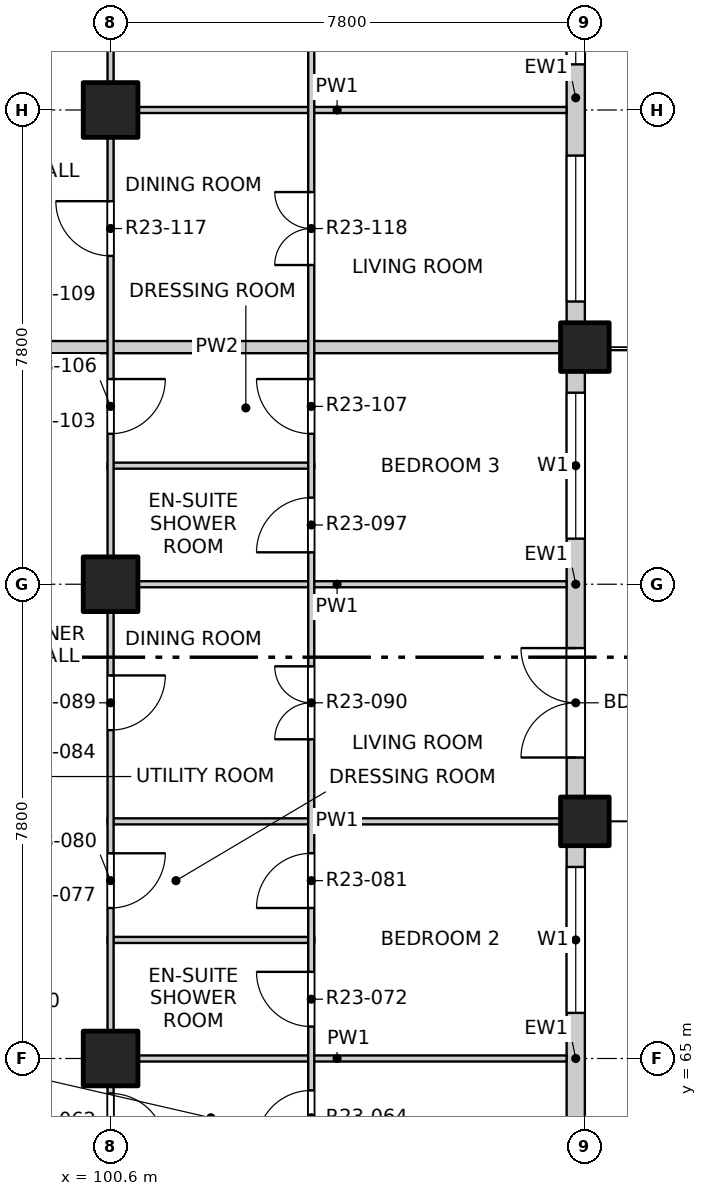
"""IFC4 building model, lengths in metres.
Left out: names, types, materials, properties, quantities, classifications, styles, units other than length and angle.
Written with IfcOpenShell. Run it as: python <this file> out.ifc"""

import sys

from ifc_helpers import new_model, si_unit, direction, frame, frame_2d, origin, origin_2d, place, context, subcontext, project, spatial, rectangle, extrude, element, fill, save


model = new_model("IFC4")
c1 = context("Model", 3, precision=1e-05, world=origin(), true_north=direction((0.0, 1.0)))
c2 = subcontext(c1, "Body", "Model", "MODEL_VIEW")
j1 = project(units=[si_unit("LENGTHUNIT", "METRE"), si_unit("PLANEANGLEUNIT", "RADIAN")], contexts=[c1])
p1 = place(None, origin())
s1 = spatial("IfcSite", under=j1, at=p1, CompositionType="ELEMENT")
p2 = place(p1, origin())
s2 = spatial("IfcBuilding", under=s1, at=p2, CompositionType="ELEMENT")
p3 = place(p2, frame((0.0, 0.0, 234.7)))
s3 = spatial("IfcBuildingStorey", under=s2, at=p3, CompositionType="ELEMENT", Elevation=234.7)
for number, where, z_axis, x_axis in (
    (1, (108.4, 68.9, -0.25), (0.0, 0.0, 1.0), (1.0, 0.0, 0.0)),
    (2, (108.4, 76.7, -0.25), (0.0, 0.0, 1.0), (1.0, 0.0, 0.0)),
):
    element("IfcColumn", number, at=place(p3, frame(where, z_axis=z_axis, x_axis=x_axis)), inside=s3, PredefinedType="COLUMN", context=c2, shape_type="SweptSolid", body=[
        extrude(rectangle(XDim=0.8, YDim=0.8, at=origin_2d()), origin(), (0.0, 0.0, 1.0), 3.4),
    ])
for number, where, z_axis, x_axis in (
    (3, (100.6, 65.0, -0.25), (0.0, 0.0, 1.0), (1.0, 0.0, 0.0)),
    (4, (100.6, 72.8, -0.25), (0.0, 0.0, 1.0), (1.0, 0.0, 0.0)),
    (5, (100.6, 80.6, -0.25), (0.0, 0.0, 1.0), (1.0, 0.0, 0.0)),
):
    element("IfcColumn", number, at=place(p3, frame(where, z_axis=z_axis, x_axis=x_axis)), inside=s3, PredefinedType="COLUMN", context=c2, shape_type="SweptSolid", body=[
        extrude(rectangle(XDim=0.9, YDim=0.9, at=origin_2d()), origin(), (0.0, 0.0, 1.0), 3.4),
    ])
p4 = place(p3, frame((108.25, 61.5, 0.0), z_axis=(0.0, 0.0, 1.0), x_axis=(0.0, 1.0, 0.0)))
e6 = element("IfcWall", 6, at=p4, inside=s3, PredefinedType="SOLIDWALL", context=c2, shape_type="SweptSolid", body=[
    extrude(rectangle(XDim=7.0, YDim=0.3, at=frame_2d((3.5, 0.0))), origin(), (0.0, 0.0, 1.0), 2.7),
])
p5 = place(p4, frame((0.65, 0.0, 0.0)))
e7 = element("IfcOpeningElement", 7, at=p5, cuts=e6, PredefinedType="OPENING", context=c2, shape_type="SweptSolid", body=[
    extrude(rectangle(XDim=1.8, YDim=2.4, at=frame_2d((0.9, 1.2))), frame((0.0, 0.16, 0.0), z_axis=(0.0, -1.0, 0.0), x_axis=(1.0, 0.0, 0.0)), (0.0, 0.0, 1.0), 0.32),
])
p6 = place(p4, frame((4.25, 0.0, 0.9)))
e8 = element("IfcOpeningElement", 8, at=p6, cuts=e6, PredefinedType="OPENING", context=c2, shape_type="SweptSolid", body=[
    extrude(rectangle(XDim=2.4, YDim=1.8, at=frame_2d((1.2, 0.9))), frame((0.0, 0.16, 0.0), z_axis=(0.0, -1.0, 0.0), x_axis=(1.0, 0.0, 0.0)), (0.0, 0.0, 1.0), 0.32),
])
p7 = place(p3, frame((108.25, 69.3, 0.0), z_axis=(0.0, 0.0, 1.0), x_axis=(0.0, 1.0, 0.0)))
e9 = element("IfcWall", 9, at=p7, inside=s3, PredefinedType="SOLIDWALL", context=c2, shape_type="SweptSolid", body=[
    extrude(rectangle(XDim=7.0, YDim=0.3, at=frame_2d((3.5, 0.0))), origin(), (0.0, 0.0, 1.0), 2.7),
])
p8 = place(p7, frame((0.65, 0.0, 0.0)))
e10 = element("IfcOpeningElement", 10, at=p8, cuts=e9, PredefinedType="OPENING", context=c2, shape_type="SweptSolid", body=[
    extrude(rectangle(XDim=1.8, YDim=2.4, at=frame_2d((0.9, 1.2))), frame((0.0, 0.16, 0.0), z_axis=(0.0, -1.0, 0.0), x_axis=(1.0, 0.0, 0.0)), (0.0, 0.0, 1.0), 0.32),
])
p9 = place(p7, frame((4.25, 0.0, 0.9)))
e11 = element("IfcOpeningElement", 11, at=p9, cuts=e9, PredefinedType="OPENING", context=c2, shape_type="SweptSolid", body=[
    extrude(rectangle(XDim=2.4, YDim=1.8, at=frame_2d((1.2, 0.9))), frame((0.0, 0.16, 0.0), z_axis=(0.0, -1.0, 0.0), x_axis=(1.0, 0.0, 0.0)), (0.0, 0.0, 1.0), 0.32),
])
p10 = place(p3, frame((108.25, 77.1, 0.0), z_axis=(0.0, 0.0, 1.0), x_axis=(0.0, 1.0, 0.0)))
e12 = element("IfcWall", 12, at=p10, inside=s3, PredefinedType="SOLIDWALL", context=c2, shape_type="SweptSolid", body=[
    extrude(rectangle(XDim=7.4, YDim=0.3, at=frame_2d((3.7, 0.0))), origin(), (0.0, 0.0, 1.0), 2.7),
])
p11 = place(p10, frame((0.35, 0.0, 0.9)))
e13 = element("IfcOpeningElement", 13, at=p11, cuts=e12, PredefinedType="OPENING", context=c2, shape_type="SweptSolid", body=[
    extrude(rectangle(XDim=2.4, YDim=1.8, at=frame_2d((1.2, 0.9))), frame((0.0, 0.16, 0.0), z_axis=(0.0, -1.0, 0.0), x_axis=(1.0, 0.0, 0.0)), (0.0, 0.0, 1.0), 0.32),
])
p12 = place(p10, frame((4.25, 0.0, 0.9)))
e14 = element("IfcOpeningElement", 14, at=p12, cuts=e12, PredefinedType="OPENING", context=c2, shape_type="SweptSolid", body=[
    extrude(rectangle(XDim=2.4, YDim=1.8, at=frame_2d((1.2, 0.9))), frame((0.0, 0.16, 0.0), z_axis=(0.0, -1.0, 0.0), x_axis=(1.0, 0.0, 0.0)), (0.0, 0.0, 1.0), 0.32),
])
p13 = place(p3, frame((100.55, 65.0, 0.0), z_axis=(0.0, 0.0, 1.0), x_axis=(1.0, 0.0, 0.0)))
e15 = element("IfcWall", 15, at=p13, inside=s3, PredefinedType="PARTITIONING", context=c2, shape_type="SweptSolid", body=[
    extrude(rectangle(XDim=7.55, YDim=0.1, at=frame_2d((3.775, 0.0))), origin(), (0.0, 0.0, 1.0), 3.15),
])
p14 = place(p3, frame((100.55, 66.95, 0.0), z_axis=(0.0, 0.0, 1.0), x_axis=(1.0, 0.0, 0.0)))
e16 = element("IfcWall", 16, at=p14, inside=s3, PredefinedType="PARTITIONING", context=c2, shape_type="SweptSolid", body=[
    extrude(rectangle(XDim=3.4, YDim=0.1, at=frame_2d((1.7, 0.0))), origin(), (0.0, 0.0, 1.0), 3.15),
])
p15 = place(p3, frame((100.55, 68.9, 0.0), z_axis=(0.0, 0.0, 1.0), x_axis=(1.0, 0.0, 0.0)))
e17 = element("IfcWall", 17, at=p15, inside=s3, PredefinedType="PARTITIONING", context=c2, shape_type="SweptSolid", body=[
    extrude(rectangle(XDim=7.55, YDim=0.1, at=frame_2d((3.775, 0.0))), origin(), (0.0, 0.0, 1.0), 2.55),
])
p16 = place(p3, frame((100.55, 72.8, 0.0), z_axis=(0.0, 0.0, 1.0), x_axis=(1.0, 0.0, 0.0)))
e18 = element("IfcWall", 18, at=p16, inside=s3, PredefinedType="PARTITIONING", context=c2, shape_type="SweptSolid", body=[
    extrude(rectangle(XDim=7.55, YDim=0.1, at=frame_2d((3.775, 0.0))), origin(), (0.0, 0.0, 1.0), 3.15),
])
p17 = place(p3, frame((100.55, 74.75, 0.0), z_axis=(0.0, 0.0, 1.0), x_axis=(1.0, 0.0, 0.0)))
e19 = element("IfcWall", 19, at=p17, inside=s3, PredefinedType="PARTITIONING", context=c2, shape_type="SweptSolid", body=[
    extrude(rectangle(XDim=3.4, YDim=0.1, at=frame_2d((1.7, 0.0))), origin(), (0.0, 0.0, 1.0), 3.15),
])
p18 = place(p3, frame((96.6, 76.7, 0.0), z_axis=(0.0, 0.0, 1.0), x_axis=(1.0, 0.0, 0.0)))
e20 = element("IfcWall", 20, at=p18, inside=s3, PredefinedType="PARTITIONING", context=c2, shape_type="SweptSolid", body=[
    extrude(rectangle(XDim=11.5, YDim=0.2, at=frame_2d((5.75, 0.0))), origin(), (0.0, 0.0, 1.0), 2.55),
])
p19 = place(p3, frame((100.55, 80.6, 0.0), z_axis=(0.0, 0.0, 1.0), x_axis=(1.0, 0.0, 0.0)))
e21 = element("IfcWall", 21, at=p19, inside=s3, PredefinedType="PARTITIONING", context=c2, shape_type="SweptSolid", body=[
    extrude(rectangle(XDim=7.55, YDim=0.1, at=frame_2d((3.775, 0.0))), origin(), (0.0, 0.0, 1.0), 3.15),
])
p20 = place(p3, frame((100.6, 41.9, 0.0), z_axis=(0.0, 0.0, 1.0), x_axis=(0.0, 1.0, 0.0)))
e22 = element("IfcWall", 22, at=p20, inside=s3, PredefinedType="PARTITIONING", context=c2, shape_type="SweptSolid", body=[
    extrude(rectangle(XDim=46.2, YDim=0.1, at=frame_2d((23.1, 0.0))), origin(), (0.0, 0.0, 1.0), 3.15),
])
p21 = place(p20, frame((1.2, 0.0, 0.0)))
e23 = element("IfcOpeningElement", 23, at=p21, cuts=e22, PredefinedType="OPENING", context=c2, shape_type="SweptSolid", body=[
    extrude(rectangle(XDim=0.9, YDim=2.1, at=frame_2d((0.45, 1.05))), frame((0.0, 0.06, 0.0), z_axis=(0.0, -1.0, 0.0), x_axis=(1.0, 0.0, 0.0)), (0.0, 0.0, 1.0), 0.12),
])
p22 = place(p20, frame((6.025, 0.0, 0.0)))
e24 = element("IfcOpeningElement", 24, at=p22, cuts=e22, PredefinedType="OPENING", context=c2, shape_type="SweptSolid", body=[
    extrude(rectangle(XDim=0.9, YDim=2.1, at=frame_2d((0.45, 1.05))), frame((0.0, 0.06, 0.0), z_axis=(0.0, -1.0, 0.0), x_axis=(1.0, 0.0, 0.0)), (0.0, 0.0, 1.0), 0.12),
])
p23 = place(p20, frame((9.975, 0.0, 0.0)))
e25 = element("IfcOpeningElement", 25, at=p23, cuts=e22, PredefinedType="OPENING", context=c2, shape_type="SweptSolid", body=[
    extrude(rectangle(XDim=0.9, YDim=2.1, at=frame_2d((0.45, 1.05))), frame((0.0, 0.06, 0.0), z_axis=(0.0, -1.0, 0.0), x_axis=(1.0, 0.0, 0.0)), (0.0, 0.0, 1.0), 0.12),
])
p24 = place(p20, frame((12.9, 0.0, 0.0)))
e26 = element("IfcOpeningElement", 26, at=p24, cuts=e22, PredefinedType="OPENING", context=c2, shape_type="SweptSolid", body=[
    extrude(rectangle(XDim=0.9, YDim=2.1, at=frame_2d((0.45, 1.05))), frame((0.0, 0.06, 0.0), z_axis=(0.0, -1.0, 0.0), x_axis=(1.0, 0.0, 0.0)), (0.0, 0.0, 1.0), 0.12),
])
p25 = place(p20, frame((17.775, 0.0, 0.0)))
e27 = element("IfcOpeningElement", 27, at=p25, cuts=e22, PredefinedType="OPENING", context=c2, shape_type="SweptSolid", body=[
    extrude(rectangle(XDim=0.9, YDim=2.1, at=frame_2d((0.45, 1.05))), frame((0.0, 0.06, 0.0), z_axis=(0.0, -1.0, 0.0), x_axis=(1.0, 0.0, 0.0)), (0.0, 0.0, 1.0), 0.12),
])
p26 = place(p20, frame((21.625, 0.0, 0.0)))
e28 = element("IfcOpeningElement", 28, at=p26, cuts=e22, PredefinedType="OPENING", context=c2, shape_type="SweptSolid", body=[
    extrude(rectangle(XDim=0.9, YDim=2.1, at=frame_2d((0.45, 1.05))), frame((0.0, 0.06, 0.0), z_axis=(0.0, -1.0, 0.0), x_axis=(1.0, 0.0, 0.0)), (0.0, 0.0, 1.0), 0.12),
])
p27 = place(p20, frame((25.575, 0.0, 0.0)))
e29 = element("IfcOpeningElement", 29, at=p27, cuts=e22, PredefinedType="OPENING", context=c2, shape_type="SweptSolid", body=[
    extrude(rectangle(XDim=0.9, YDim=2.1, at=frame_2d((0.45, 1.05))), frame((0.0, 0.06, 0.0), z_axis=(0.0, -1.0, 0.0), x_axis=(1.0, 0.0, 0.0)), (0.0, 0.0, 1.0), 0.12),
])
p28 = place(p20, frame((28.5, 0.0, 0.0)))
e30 = element("IfcOpeningElement", 30, at=p28, cuts=e22, PredefinedType="OPENING", context=c2, shape_type="SweptSolid", body=[
    extrude(rectangle(XDim=0.9, YDim=2.1, at=frame_2d((0.45, 1.05))), frame((0.0, 0.06, 0.0), z_axis=(0.0, -1.0, 0.0), x_axis=(1.0, 0.0, 0.0)), (0.0, 0.0, 1.0), 0.12),
])
p29 = place(p20, frame((33.375, 0.0, 0.0)))
e31 = element("IfcOpeningElement", 31, at=p29, cuts=e22, PredefinedType="OPENING", context=c2, shape_type="SweptSolid", body=[
    extrude(rectangle(XDim=0.9, YDim=2.1, at=frame_2d((0.45, 1.05))), frame((0.0, 0.06, 0.0), z_axis=(0.0, -1.0, 0.0), x_axis=(1.0, 0.0, 0.0)), (0.0, 0.0, 1.0), 0.12),
])
p30 = place(p20, frame((36.3, 0.0, 0.0)))
e32 = element("IfcOpeningElement", 32, at=p30, cuts=e22, PredefinedType="OPENING", context=c2, shape_type="SweptSolid", body=[
    extrude(rectangle(XDim=0.9, YDim=2.1, at=frame_2d((0.45, 1.05))), frame((0.0, 0.06, 0.0), z_axis=(0.0, -1.0, 0.0), x_axis=(1.0, 0.0, 0.0)), (0.0, 0.0, 1.0), 0.12),
])
p31 = place(p20, frame((40.2, 0.0, 0.0)))
e33 = element("IfcOpeningElement", 33, at=p31, cuts=e22, PredefinedType="OPENING", context=c2, shape_type="SweptSolid", body=[
    extrude(rectangle(XDim=0.9, YDim=2.1, at=frame_2d((0.45, 1.05))), frame((0.0, 0.06, 0.0), z_axis=(0.0, -1.0, 0.0), x_axis=(1.0, 0.0, 0.0)), (0.0, 0.0, 1.0), 0.12),
])
p32 = place(p20, frame((44.1, 0.0, 0.0)))
e34 = element("IfcOpeningElement", 34, at=p32, cuts=e22, PredefinedType="OPENING", context=c2, shape_type="SweptSolid", body=[
    extrude(rectangle(XDim=0.9, YDim=2.1, at=frame_2d((0.45, 1.05))), frame((0.0, 0.06, 0.0), z_axis=(0.0, -1.0, 0.0), x_axis=(1.0, 0.0, 0.0)), (0.0, 0.0, 1.0), 0.12),
])
p33 = place(p3, frame((103.9, 61.2, 0.0), z_axis=(0.0, 0.0, 1.0), x_axis=(0.0, 1.0, 0.0)))
e35 = element("IfcWall", 35, at=p33, inside=s3, PredefinedType="PARTITIONING", context=c2, shape_type="SweptSolid", body=[
    extrude(rectangle(XDim=26.9, YDim=0.1, at=frame_2d((13.45, 0.0))), origin(), (0.0, 0.0, 1.0), 3.15),
])
p34 = place(p33, frame((0.425, 0.0, 0.0)))
e36 = element("IfcOpeningElement", 36, at=p34, cuts=e35, PredefinedType="OPENING", context=c2, shape_type="SweptSolid", body=[
    extrude(rectangle(XDim=0.9, YDim=2.1, at=frame_2d((0.45, 1.05))), frame((0.0, 0.06, 0.0), z_axis=(0.0, -1.0, 0.0), x_axis=(1.0, 0.0, 0.0)), (0.0, 0.0, 1.0), 0.12),
])
p35 = place(p33, frame((2.375, 0.0, 0.0)))
e37 = element("IfcOpeningElement", 37, at=p35, cuts=e35, PredefinedType="OPENING", context=c2, shape_type="SweptSolid", body=[
    extrude(rectangle(XDim=0.9, YDim=2.1, at=frame_2d((0.45, 1.05))), frame((0.0, 0.06, 0.0), z_axis=(0.0, -1.0, 0.0), x_axis=(1.0, 0.0, 0.0)), (0.0, 0.0, 1.0), 0.12),
])
p36 = place(p33, frame((4.325, 0.0, 0.0)))
e38 = element("IfcOpeningElement", 38, at=p36, cuts=e35, PredefinedType="OPENING", context=c2, shape_type="SweptSolid", body=[
    extrude(rectangle(XDim=0.9, YDim=2.1, at=frame_2d((0.45, 1.05))), frame((0.0, 0.06, 0.0), z_axis=(0.0, -1.0, 0.0), x_axis=(1.0, 0.0, 0.0)), (0.0, 0.0, 1.0), 0.12),
])
p37 = place(p33, frame((6.275, 0.0, 0.0)))
e39 = element("IfcOpeningElement", 39, at=p37, cuts=e35, PredefinedType="OPENING", context=c2, shape_type="SweptSolid", body=[
    extrude(rectangle(XDim=0.9, YDim=2.1, at=frame_2d((0.45, 1.05))), frame((0.0, 0.06, 0.0), z_axis=(0.0, -1.0, 0.0), x_axis=(1.0, 0.0, 0.0)), (0.0, 0.0, 1.0), 0.12),
])
p38 = place(p33, frame((9.05, 0.0, 0.0)))
e40 = element("IfcOpeningElement", 40, at=p38, cuts=e35, PredefinedType="OPENING", context=c2, shape_type="SweptSolid", body=[
    extrude(rectangle(XDim=1.2, YDim=2.1, at=frame_2d((0.6, 1.05))), frame((0.0, 0.06, 0.0), z_axis=(0.0, -1.0, 0.0), x_axis=(1.0, 0.0, 0.0)), (0.0, 0.0, 1.0), 0.12),
])
p39 = place(p33, frame((12.125, 0.0, 0.0)))
e41 = element("IfcOpeningElement", 41, at=p39, cuts=e35, PredefinedType="OPENING", context=c2, shape_type="SweptSolid", body=[
    extrude(rectangle(XDim=0.9, YDim=2.1, at=frame_2d((0.45, 1.05))), frame((0.0, 0.06, 0.0), z_axis=(0.0, -1.0, 0.0), x_axis=(1.0, 0.0, 0.0)), (0.0, 0.0, 1.0), 0.12),
])
p40 = place(p33, frame((14.075, 0.0, 0.0)))
e42 = element("IfcOpeningElement", 42, at=p40, cuts=e35, PredefinedType="OPENING", context=c2, shape_type="SweptSolid", body=[
    extrude(rectangle(XDim=0.9, YDim=2.1, at=frame_2d((0.45, 1.05))), frame((0.0, 0.06, 0.0), z_axis=(0.0, -1.0, 0.0), x_axis=(1.0, 0.0, 0.0)), (0.0, 0.0, 1.0), 0.12),
])
p41 = place(p33, frame((16.85, 0.0, 0.0)))
e43 = element("IfcOpeningElement", 43, at=p41, cuts=e35, PredefinedType="OPENING", context=c2, shape_type="SweptSolid", body=[
    extrude(rectangle(XDim=1.2, YDim=2.1, at=frame_2d((0.6, 1.05))), frame((0.0, 0.06, 0.0), z_axis=(0.0, -1.0, 0.0), x_axis=(1.0, 0.0, 0.0)), (0.0, 0.0, 1.0), 0.12),
])
p42 = place(p33, frame((20.75, 0.0, 0.0)))
e44 = element("IfcOpeningElement", 44, at=p42, cuts=e35, PredefinedType="OPENING", context=c2, shape_type="SweptSolid", body=[
    extrude(rectangle(XDim=1.2, YDim=2.1, at=frame_2d((0.6, 1.05))), frame((0.0, 0.06, 0.0), z_axis=(0.0, -1.0, 0.0), x_axis=(1.0, 0.0, 0.0)), (0.0, 0.0, 1.0), 0.12),
])
p43 = place(p33, frame((24.65, 0.0, 0.0)))
e45 = element("IfcOpeningElement", 45, at=p43, cuts=e35, PredefinedType="OPENING", context=c2, shape_type="SweptSolid", body=[
    extrude(rectangle(XDim=1.2, YDim=2.1, at=frame_2d((0.6, 1.05))), frame((0.0, 0.06, 0.0), z_axis=(0.0, -1.0, 0.0), x_axis=(1.0, 0.0, 0.0)), (0.0, 0.0, 1.0), 0.12),
])
p44 = place(p6, origin())
e46 = element("IfcWindow", 46, at=p44, inside=s3, PartitioningType="DOUBLE_PANEL_VERTICAL", PredefinedType="WINDOW", context=c2, shape_type="SweptSolid", body=[
    extrude(rectangle(XDim=2.4, YDim=1.8, at=frame_2d((1.2, 0.9))), frame((0.0, 0.03, 0.0), z_axis=(0.0, -1.0, 0.0), x_axis=(1.0, 0.0, 0.0)), (0.0, 0.0, 1.0), 0.06),
])
fill(e8, e46)
p45 = place(p8, origin())
e47 = element("IfcDoor", 47, at=p45, inside=s3, OperationType="DOUBLE_DOOR_SINGLE_SWING", PredefinedType="DOOR", context=c2, shape_type="SweptSolid", body=[
    extrude(rectangle(XDim=1.8, YDim=2.4, at=frame_2d((0.9, 1.2))), frame((0.0, 0.025, 0.0), z_axis=(0.0, -1.0, 0.0), x_axis=(1.0, 0.0, 0.0)), (0.0, 0.0, 1.0), 0.05),
])
fill(e10, e47)
p46 = place(p9, origin())
e48 = element("IfcWindow", 48, at=p46, inside=s3, PartitioningType="DOUBLE_PANEL_VERTICAL", PredefinedType="WINDOW", context=c2, shape_type="SweptSolid", body=[
    extrude(rectangle(XDim=2.4, YDim=1.8, at=frame_2d((1.2, 0.9))), frame((0.0, 0.03, 0.0), z_axis=(0.0, -1.0, 0.0), x_axis=(1.0, 0.0, 0.0)), (0.0, 0.0, 1.0), 0.06),
])
fill(e11, e48)
p47 = place(p11, origin())
e49 = element("IfcWindow", 49, at=p47, inside=s3, PartitioningType="DOUBLE_PANEL_VERTICAL", PredefinedType="WINDOW", context=c2, shape_type="SweptSolid", body=[
    extrude(rectangle(XDim=2.4, YDim=1.8, at=frame_2d((1.2, 0.9))), frame((0.0, 0.03, 0.0), z_axis=(0.0, -1.0, 0.0), x_axis=(1.0, 0.0, 0.0)), (0.0, 0.0, 1.0), 0.06),
])
fill(e13, e49)
p48 = place(p12, origin())
e50 = element("IfcWindow", 50, at=p48, inside=s3, PartitioningType="DOUBLE_PANEL_VERTICAL", PredefinedType="WINDOW", context=c2, shape_type="SweptSolid", body=[
    extrude(rectangle(XDim=2.4, YDim=1.8, at=frame_2d((1.2, 0.9))), frame((0.0, 0.03, 0.0), z_axis=(0.0, -1.0, 0.0), x_axis=(1.0, 0.0, 0.0)), (0.0, 0.0, 1.0), 0.06),
])
fill(e14, e50)
p49 = place(p26, origin())
e51 = element("IfcDoor", 51, at=p49, inside=s3, OperationType="SINGLE_SWING_RIGHT", PredefinedType="DOOR", context=c2, shape_type="SweptSolid", body=[
    extrude(rectangle(XDim=0.9, YDim=2.1, at=frame_2d((0.45, 1.05))), frame((0.0, 0.025, 0.0), z_axis=(0.0, -1.0, 0.0), x_axis=(1.0, 0.0, 0.0)), (0.0, 0.0, 1.0), 0.05),
])
fill(e28, e51)
p50 = place(p35, origin())
e52 = element("IfcDoor", 52, at=p50, inside=s3, OperationType="SINGLE_SWING_LEFT", PredefinedType="DOOR", context=c2, shape_type="SweptSolid", body=[
    extrude(rectangle(XDim=0.9, YDim=2.1, at=frame_2d((0.45, 1.05))), frame((0.0, 0.025, 0.0), z_axis=(0.0, -1.0, 0.0), x_axis=(1.0, 0.0, 0.0)), (0.0, 0.0, 1.0), 0.05),
])
fill(e37, e52)
p51 = place(p36, origin())
e53 = element("IfcDoor", 53, at=p51, inside=s3, OperationType="SINGLE_SWING_RIGHT", PredefinedType="DOOR", context=c2, shape_type="SweptSolid", body=[
    extrude(rectangle(XDim=0.9, YDim=2.1, at=frame_2d((0.45, 1.05))), frame((0.0, 0.025, 0.0), z_axis=(0.0, -1.0, 0.0), x_axis=(1.0, 0.0, 0.0)), (0.0, 0.0, 1.0), 0.05),
])
fill(e38, e53)
p52 = place(p27, origin())
e54 = element("IfcDoor", 54, at=p52, inside=s3, OperationType="SINGLE_SWING_LEFT", PredefinedType="DOOR", context=c2, shape_type="SweptSolid", body=[
    extrude(rectangle(XDim=0.9, YDim=2.1, at=frame_2d((0.45, 1.05))), frame((0.0, 0.025, 0.0), z_axis=(0.0, -1.0, 0.0), x_axis=(1.0, 0.0, 0.0)), (0.0, 0.0, 1.0), 0.05),
])
fill(e29, e54)
p53 = place(p37, origin())
e55 = element("IfcDoor", 55, at=p53, inside=s3, OperationType="SINGLE_SWING_LEFT", PredefinedType="DOOR", context=c2, shape_type="SweptSolid", body=[
    extrude(rectangle(XDim=0.9, YDim=2.1, at=frame_2d((0.45, 1.05))), frame((0.0, 0.025, 0.0), z_axis=(0.0, -1.0, 0.0), x_axis=(1.0, 0.0, 0.0)), (0.0, 0.0, 1.0), 0.05),
])
fill(e39, e55)
p54 = place(p28, origin())
e56 = element("IfcDoor", 56, at=p54, inside=s3, OperationType="SINGLE_SWING_LEFT", PredefinedType="DOOR", context=c2, shape_type="SweptSolid", body=[
    extrude(rectangle(XDim=0.9, YDim=2.1, at=frame_2d((0.45, 1.05))), frame((0.0, 0.025, 0.0), z_axis=(0.0, -1.0, 0.0), x_axis=(1.0, 0.0, 0.0)), (0.0, 0.0, 1.0), 0.05),
])
fill(e30, e56)
p55 = place(p38, origin())
e57 = element("IfcDoor", 57, at=p55, inside=s3, OperationType="DOUBLE_DOOR_SINGLE_SWING", PredefinedType="DOOR", context=c2, shape_type="SweptSolid", body=[
    extrude(rectangle(XDim=1.2, YDim=2.1, at=frame_2d((0.6, 1.05))), frame((0.0, 0.025, 0.0), z_axis=(0.0, -1.0, 0.0), x_axis=(1.0, 0.0, 0.0)), (0.0, 0.0, 1.0), 0.05),
])
fill(e40, e57)
p56 = place(p39, origin())
e58 = element("IfcDoor", 58, at=p56, inside=s3, OperationType="SINGLE_SWING_LEFT", PredefinedType="DOOR", context=c2, shape_type="SweptSolid", body=[
    extrude(rectangle(XDim=0.9, YDim=2.1, at=frame_2d((0.45, 1.05))), frame((0.0, 0.025, 0.0), z_axis=(0.0, -1.0, 0.0), x_axis=(1.0, 0.0, 0.0)), (0.0, 0.0, 1.0), 0.05),
])
fill(e41, e58)
p57 = place(p29, origin())
e59 = element("IfcDoor", 59, at=p57, inside=s3, OperationType="SINGLE_SWING_LEFT", PredefinedType="DOOR", context=c2, shape_type="SweptSolid", body=[
    extrude(rectangle(XDim=0.9, YDim=2.1, at=frame_2d((0.45, 1.05))), frame((0.0, 0.025, 0.0), z_axis=(0.0, -1.0, 0.0), x_axis=(1.0, 0.0, 0.0)), (0.0, 0.0, 1.0), 0.05),
])
fill(e31, e59)
p58 = place(p40, origin())
e60 = element("IfcDoor", 60, at=p58, inside=s3, OperationType="SINGLE_SWING_RIGHT", PredefinedType="DOOR", context=c2, shape_type="SweptSolid", body=[
    extrude(rectangle(XDim=0.9, YDim=2.1, at=frame_2d((0.45, 1.05))), frame((0.0, 0.025, 0.0), z_axis=(0.0, -1.0, 0.0), x_axis=(1.0, 0.0, 0.0)), (0.0, 0.0, 1.0), 0.05),
])
fill(e42, e60)
p59 = place(p30, origin())
e61 = element("IfcDoor", 61, at=p59, inside=s3, OperationType="SINGLE_SWING_RIGHT", PredefinedType="DOOR", context=c2, shape_type="SweptSolid", body=[
    extrude(rectangle(XDim=0.9, YDim=2.1, at=frame_2d((0.45, 1.05))), frame((0.0, 0.025, 0.0), z_axis=(0.0, -1.0, 0.0), x_axis=(1.0, 0.0, 0.0)), (0.0, 0.0, 1.0), 0.05),
])
fill(e32, e61)
p60 = place(p41, origin())
e62 = element("IfcDoor", 62, at=p60, inside=s3, OperationType="DOUBLE_DOOR_SINGLE_SWING", PredefinedType="DOOR", context=c2, shape_type="SweptSolid", body=[
    extrude(rectangle(XDim=1.2, YDim=2.1, at=frame_2d((0.6, 1.05))), frame((0.0, 0.025, 0.0), z_axis=(0.0, -1.0, 0.0), x_axis=(1.0, 0.0, 0.0)), (0.0, 0.0, 1.0), 0.05),
])
fill(e43, e62)
save(model, sys.argv[1])
